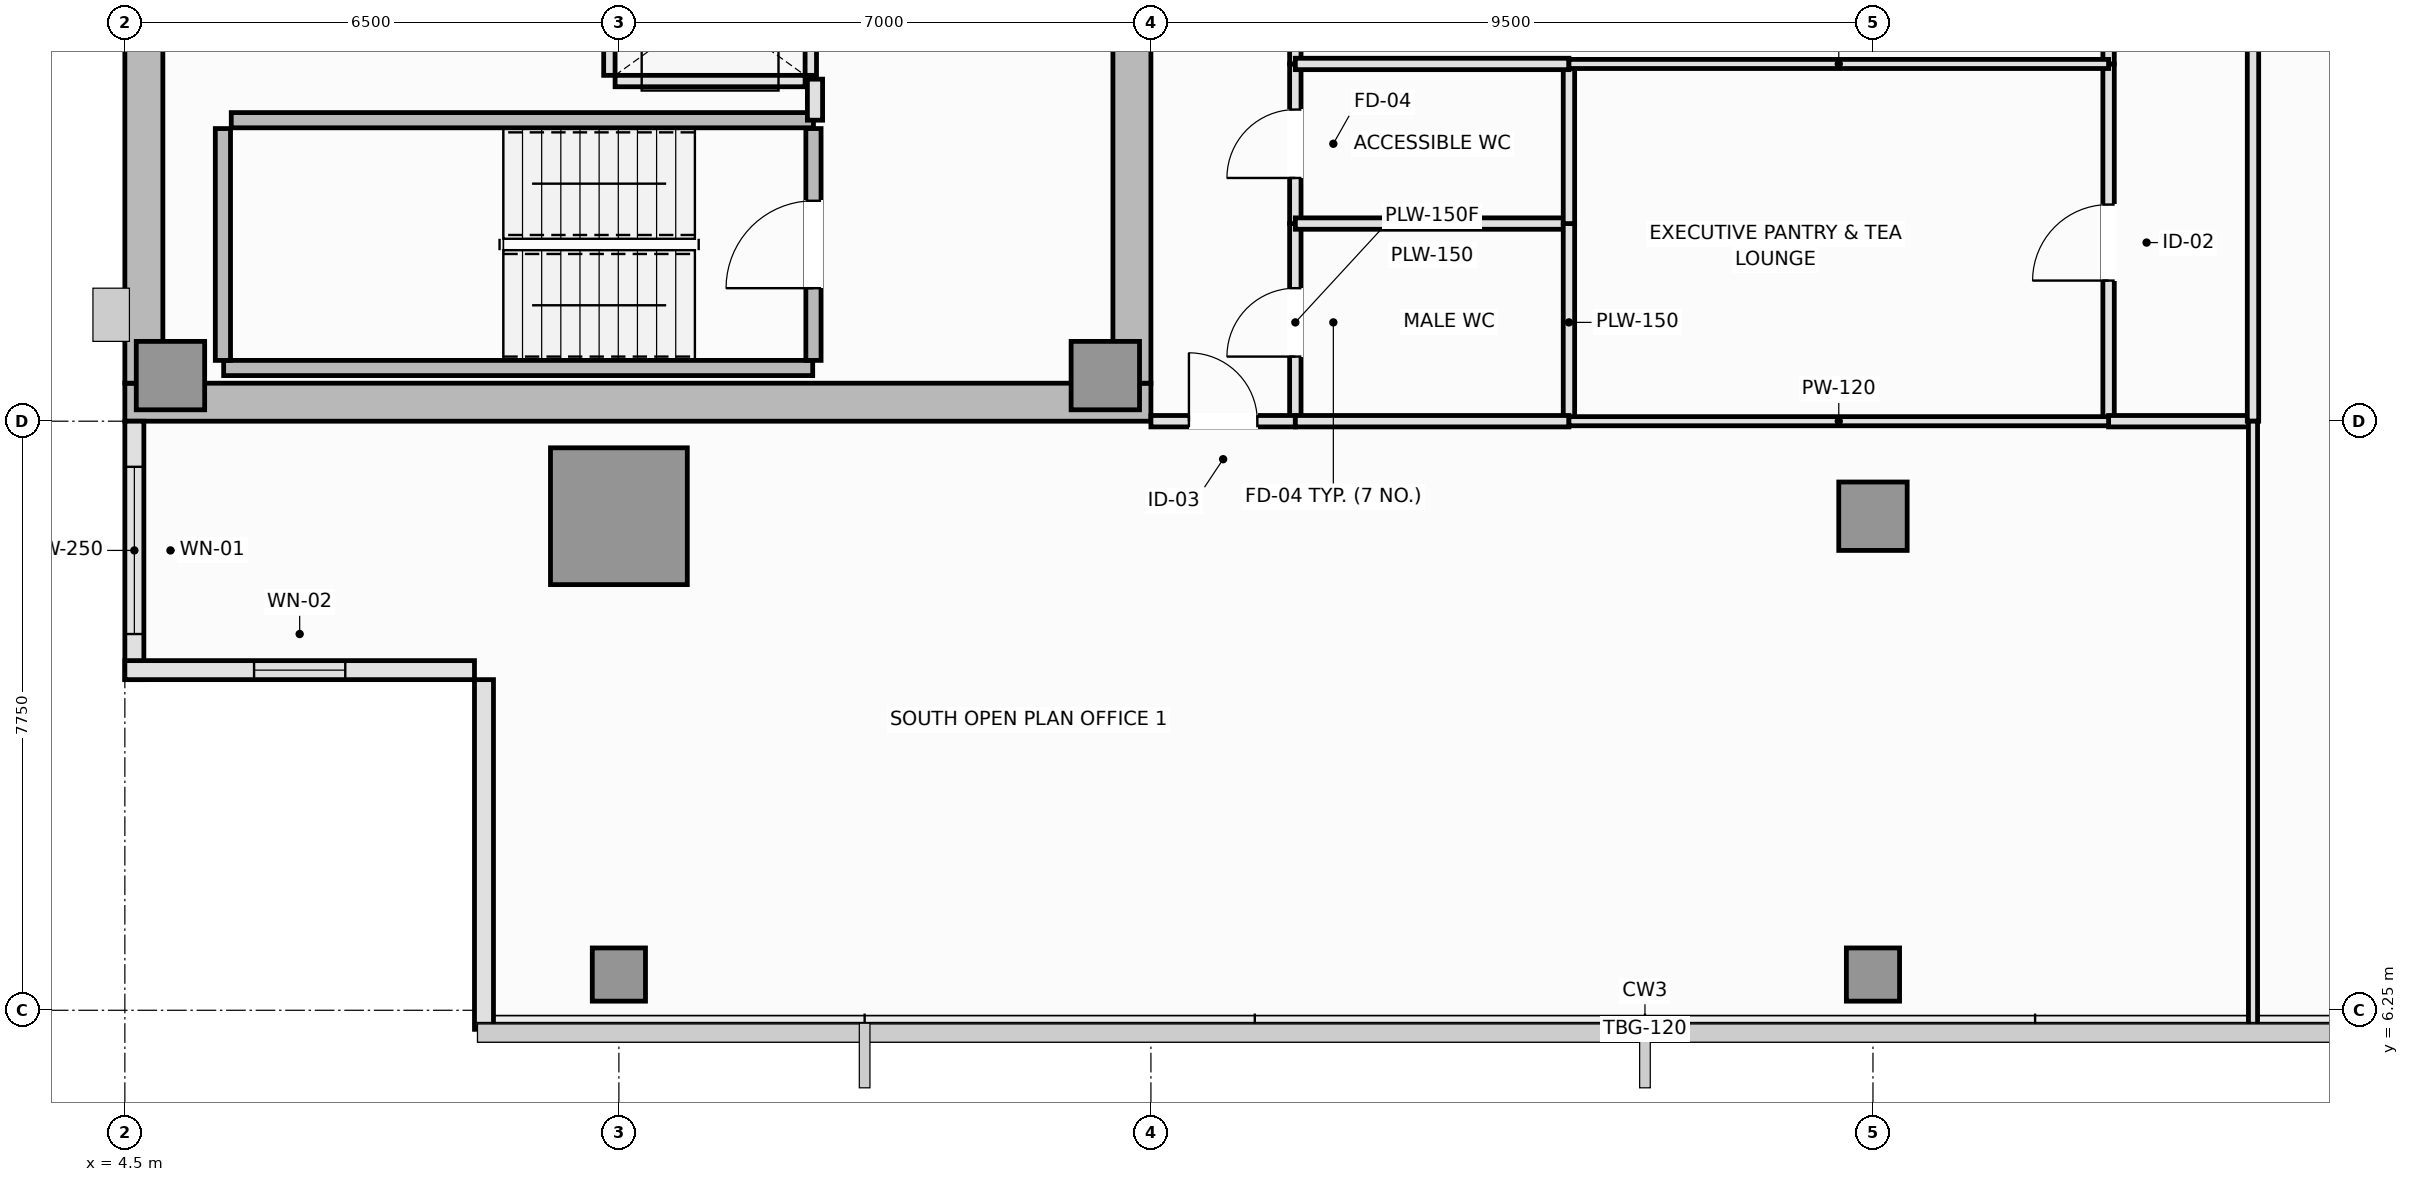
"""IFC4 building model, lengths in metres.
Left out: names, types, materials, properties, quantities, classifications, styles, units other than length and angle.
Written with IfcOpenShell. Run it as: python <this file> out.ifc"""

import sys

from ifc_helpers import new_model, si_unit, direction, frame, frame_2d, origin, origin_2d, place, context, subcontext, project, spatial, rectangle, extrude, element, fill, save


model = new_model("IFC4")
c1 = context("Model", 3, precision=1e-05, world=origin(), true_north=direction((0.0, 1.0)))
c2 = subcontext(c1, "Body", "Model", "MODEL_VIEW")
j1 = project(units=[si_unit("LENGTHUNIT", "METRE"), si_unit("PLANEANGLEUNIT", "RADIAN")], contexts=[c1])
p1 = place(None, origin())
s1 = spatial("IfcSite", under=j1, at=p1, CompositionType="ELEMENT")
p2 = place(p1, origin())
s2 = spatial("IfcBuilding", under=s1, at=p2, CompositionType="ELEMENT")
p3 = place(p2, frame((0.0, 0.0, 259.9)))
s3 = spatial("IfcBuildingStorey", under=s2, at=p3, CompositionType="ELEMENT", Elevation=259.9)
p4 = place(p3, frame((4.5, 14.25, 0.0), z_axis=(0.0, 0.0, 1.0), x_axis=(1.0, 0.0, 0.0)))
e1 = element("IfcWall", 1, at=p4, inside=s3, PredefinedType="SHEAR", context=c2, shape_type="SweptSolid", body=[
    extrude(rectangle(XDim=13.5, YDim=0.5, at=frame_2d((6.75, 0.0))), origin(), (0.0, 0.0, 1.0), 3.55),
])
p5 = place(p3, frame((4.75, 14.5, 0.0), z_axis=(0.0, 0.0, 1.0), x_axis=(0.0, 1.0, 0.0)))
e2 = element("IfcWall", 2, at=p5, inside=s3, PredefinedType="SHEAR", context=c2, shape_type="SweptSolid", body=[
    extrude(rectangle(XDim=21.5, YDim=0.5, at=frame_2d((10.75, 0.0))), origin(), (0.0, 0.0, 1.0), 3.55),
])
p6 = place(p3, frame((17.75, 14.5, 0.0), z_axis=(0.0, 0.0, 1.0), x_axis=(0.0, 1.0, 0.0)))
e3 = element("IfcWall", 3, at=p6, inside=s3, PredefinedType="SHEAR", context=c2, shape_type="SweptSolid", body=[
    extrude(rectangle(XDim=8.95, YDim=0.5, at=frame_2d((4.475, 0.0))), origin(), (0.0, 0.0, 1.0), 3.55),
])
p7 = place(p6, frame((4.4, 0.0, 0.0)))
e4 = element("IfcOpeningElement", 4, at=p7, cuts=e3, PredefinedType="OPENING", context=c2, shape_type="SweptSolid", body=[
    extrude(rectangle(XDim=1.1, YDim=2.15, at=frame_2d((0.55, 1.075))), frame((0.0, 0.26, 0.0), z_axis=(0.0, -1.0, 0.0), x_axis=(1.0, 0.0, 0.0)), (0.0, 0.0, 1.0), 0.52),
])
for number, where, z_axis, x_axis in (
    (5, (5.1, 14.6, 0.0), (0.0, 0.0, 1.0), (1.0, 0.0, 0.0)),
    (6, (17.4, 14.6, 0.0), (0.0, 0.0, 1.0), (1.0, 0.0, 0.0)),
):
    element("IfcColumn", number, at=place(p3, frame(where, z_axis=z_axis, x_axis=x_axis)), inside=s3, PredefinedType="PILASTER", context=c2, shape_type="SweptSolid", body=[
        extrude(rectangle(XDim=0.9, YDim=0.9, at=origin_2d()), origin(), (0.0, 0.0, 1.0), 3.55),
    ])
p8 = place(p3, frame((11.0, 12.75, 0.0), z_axis=(0.0, 0.0, 1.0), x_axis=(1.0, 0.0, 0.0)))
e7 = element("IfcColumn", 7, at=p8, inside=s3, PredefinedType="COLUMN", context=c2, shape_type="SweptSolid", body=[
    extrude(rectangle(XDim=1.8, YDim=1.8, at=origin_2d()), origin(), (0.0, 0.0, 1.0), 3.55),
])
p9 = place(p3, frame((27.5, 12.75, 0.0), z_axis=(0.0, 0.0, 1.0), x_axis=(1.0, 0.0, 0.0)))
e8 = element("IfcColumn", 8, at=p9, inside=s3, PredefinedType="COLUMN", context=c2, shape_type="SweptSolid", body=[
    extrude(rectangle(XDim=0.9, YDim=0.9, at=origin_2d()), origin(), (0.0, 0.0, 1.0), 3.55),
])
for number, where, z_axis, x_axis in (
    (9, (11.0, 6.72, 0.0), (0.0, 0.0, 1.0), (1.0, 0.0, 0.0)),
    (10, (27.5, 6.72, 0.0), (0.0, 0.0, 1.0), (1.0, 0.0, 0.0)),
):
    element("IfcColumn", number, at=place(p3, frame(where, z_axis=z_axis, x_axis=x_axis)), inside=s3, PredefinedType="COLUMN", context=c2, shape_type="SweptSolid", body=[
        extrude(rectangle(XDim=0.7, YDim=0.7, at=origin_2d()), origin(), (0.0, 0.0, 1.0), 3.55),
    ])
p10 = place(p3, frame((4.625, 14.0, 0.0), z_axis=(0.0, 0.0, 1.0), x_axis=(0.0, -1.0, 0.0)))
e11 = element("IfcWall", 11, at=p10, inside=s3, PredefinedType="SOLIDWALL", context=c2, shape_type="SweptSolid", body=[
    extrude(rectangle(XDim=3.4, YDim=0.25, at=frame_2d((1.7, 0.0))), origin(), (0.0, 0.0, 1.0), 3.39),
])
p11 = place(p10, frame((0.6, 0.0, 0.9)))
e12 = element("IfcOpeningElement", 12, at=p11, cuts=e11, PredefinedType="OPENING", context=c2, shape_type="SweptSolid", body=[
    extrude(rectangle(XDim=2.2, YDim=1.8, at=frame_2d((1.1, 0.9))), frame((0.0, 0.135, 0.0), z_axis=(0.0, -1.0, 0.0), x_axis=(1.0, 0.0, 0.0)), (0.0, 0.0, 1.0), 0.27),
])
p12 = place(p3, frame((4.5, 10.725, 0.0), z_axis=(0.0, 0.0, 1.0), x_axis=(1.0, 0.0, 0.0)))
e13 = element("IfcWall", 13, at=p12, inside=s3, PredefinedType="SOLIDWALL", context=c2, shape_type="SweptSolid", body=[
    extrude(rectangle(XDim=4.6, YDim=0.25, at=frame_2d((2.3, 0.0))), origin(), (0.0, 0.0, 1.0), 3.39),
])
p13 = place(p12, frame((1.7, 0.0, 0.9)))
e14 = element("IfcOpeningElement", 14, at=p13, cuts=e13, PredefinedType="OPENING", context=c2, shape_type="SweptSolid", body=[
    extrude(rectangle(XDim=1.2, YDim=1.8, at=frame_2d((0.6, 0.9))), frame((0.0, 0.135, 0.0), z_axis=(0.0, -1.0, 0.0), x_axis=(1.0, 0.0, 0.0)), (0.0, 0.0, 1.0), 0.27),
])
p14 = place(p3, frame((9.225, 10.6, 0.0), z_axis=(0.0, 0.0, 1.0), x_axis=(0.0, -1.0, 0.0)))
e15 = element("IfcWall", 15, at=p14, inside=s3, PredefinedType="SOLIDWALL", context=c2, shape_type="SweptSolid", body=[
    extrude(rectangle(XDim=4.6, YDim=0.25, at=frame_2d((2.3, 0.0))), origin(), (0.0, 0.0, 1.0), 3.39),
])
p15 = place(p3, frame((5.8, 14.7, 0.0), z_axis=(0.0, 0.0, 1.0), x_axis=(1.0, 0.0, 0.0)))
e16 = element("IfcWall", 16, at=p15, inside=s3, PredefinedType="SOLIDWALL", context=c2, shape_type="SweptSolid", body=[
    extrude(rectangle(XDim=7.75, YDim=0.2, at=frame_2d((3.875, 0.0))), origin(), (0.0, 0.0, 1.0), 3.55),
])
p16 = place(p3, frame((5.79, 14.8, 0.0), z_axis=(0.0, 0.0, 1.0), x_axis=(0.0, 1.0, 0.0)))
e17 = element("IfcWall", 17, at=p16, inside=s3, PredefinedType="SOLIDWALL", context=c2, shape_type="SweptSolid", body=[
    extrude(rectangle(XDim=3.05, YDim=0.2, at=frame_2d((1.525, 0.0))), origin(), (0.0, 0.0, 1.0), 3.55),
])
p17 = place(p3, frame((5.9, 17.96, 0.0), z_axis=(0.0, 0.0, 1.0), x_axis=(1.0, 0.0, 0.0)))
e18 = element("IfcWall", 18, at=p17, inside=s3, PredefinedType="SOLIDWALL", context=c2, shape_type="SweptSolid", body=[
    extrude(rectangle(XDim=7.66, YDim=0.2, at=frame_2d((3.83, 0.0))), origin(), (0.0, 0.0, 1.0), 3.55),
])
p18 = place(p3, frame((13.56, 14.8, 0.0), z_axis=(0.0, 0.0, 1.0), x_axis=(0.0, 1.0, 0.0)))
e19 = element("IfcWall", 19, at=p18, inside=s3, PredefinedType="SOLIDWALL", context=c2, shape_type="SweptSolid", body=[
    extrude(rectangle(XDim=3.05, YDim=0.2, at=frame_2d((1.525, 0.0))), origin(), (0.0, 0.0, 1.0), 3.55),
])
p19 = place(p18, frame((0.95, 0.0, 0.0)))
e20 = element("IfcOpeningElement", 20, at=p19, cuts=e19, PredefinedType="OPENING", context=c2, shape_type="SweptSolid", body=[
    extrude(rectangle(XDim=1.15, YDim=2.15, at=frame_2d((0.575, 1.075))), frame((0.0, 0.11, 0.0), z_axis=(0.0, -1.0, 0.0), x_axis=(1.0, 0.0, 0.0)), (0.0, 0.0, 1.0), 0.22),
])
p20 = place(p3, frame((10.95, 18.475, 0.0), z_axis=(0.0, 0.0, 1.0), x_axis=(1.0, 0.0, 0.0)))
e21 = element("IfcWall", 21, at=p20, inside=s3, PredefinedType="PARTITIONING", context=c2, shape_type="SweptSolid", body=[
    extrude(rectangle(XDim=2.5, YDim=0.15, at=frame_2d((1.25, 0.0))), origin(), (0.0, 0.0, 1.0), 3.39),
])
p21 = place(p3, frame((10.875, 18.55, 0.0), z_axis=(0.0, 0.0, 1.0), x_axis=(0.0, 1.0, 0.0)))
e22 = element("IfcWall", 22, at=p21, inside=s3, PredefinedType="PARTITIONING", context=c2, shape_type="SweptSolid", body=[
    extrude(rectangle(XDim=1.8, YDim=0.15, at=frame_2d((0.9, 0.0))), origin(), (0.0, 0.0, 1.0), 3.39),
])
p22 = place(p3, frame((13.525, 18.55, 0.0), z_axis=(0.0, 0.0, 1.0), x_axis=(0.0, 1.0, 0.0)))
e23 = element("IfcWall", 23, at=p22, inside=s3, PredefinedType="PARTITIONING", context=c2, shape_type="SweptSolid", body=[
    extrude(rectangle(XDim=1.8, YDim=0.15, at=frame_2d((0.9, 0.0))), origin(), (0.0, 0.0, 1.0), 3.39),
])
p23 = place(p22, frame((0.35, 0.0, 0.0)))
e24 = element("IfcOpeningElement", 24, at=p23, cuts=e23, PredefinedType="OPENING", context=c2, shape_type="SweptSolid", body=[
    extrude(rectangle(XDim=1.1, YDim=2.2, at=frame_2d((0.55, 1.1))), frame((0.0, 0.085, 0.0), z_axis=(0.0, -1.0, 0.0), x_axis=(1.0, 0.0, 0.0)), (0.0, 0.0, 1.0), 0.17),
])
p24 = place(p3, frame((13.58, 17.96, 0.0), z_axis=(0.0, 0.0, 1.0), x_axis=(0.0, 1.0, 0.0)))
e25 = element("IfcWall", 25, at=p24, inside=s3, PredefinedType="PARTITIONING", context=c2, shape_type="SweptSolid", body=[
    extrude(rectangle(XDim=0.54, YDim=0.2, at=frame_2d((0.27, 0.0))), origin(), (0.0, 0.0, 1.0), 3.39),
])
p25 = place(p3, frame((19.9, 14.0, 0.0), z_axis=(0.0, 0.0, 1.0), x_axis=(0.0, 1.0, 0.0)))
e26 = element("IfcWall", 26, at=p25, inside=s3, PredefinedType="PLUMBINGWALL", context=c2, shape_type="SweptSolid", body=[
    extrude(rectangle(XDim=2.6, YDim=0.15, at=frame_2d((1.3, 0.0))), origin(), (0.0, 0.0, 1.0), 3.39),
])
p26 = place(p25, frame((0.85, 0.0, 0.0)))
e27 = element("IfcOpeningElement", 27, at=p26, cuts=e26, PredefinedType="OPENING", context=c2, shape_type="SweptSolid", body=[
    extrude(rectangle(XDim=0.9, YDim=2.1, at=frame_2d((0.45, 1.05))), frame((0.0, 0.085, 0.0), z_axis=(0.0, -1.0, 0.0), x_axis=(1.0, 0.0, 0.0)), (0.0, 0.0, 1.0), 0.17),
])
p27 = place(p3, frame((19.9, 16.6, 0.0), z_axis=(0.0, 0.0, 1.0), x_axis=(0.0, 1.0, 0.0)))
e28 = element("IfcWall", 28, at=p27, inside=s3, PredefinedType="PLUMBINGWALL", context=c2, shape_type="SweptSolid", body=[
    extrude(rectangle(XDim=2.1, YDim=0.15, at=frame_2d((1.05, 0.0))), origin(), (0.0, 0.0, 1.0), 3.39),
])
p28 = place(p27, frame((0.6, 0.0, 0.0)))
e29 = element("IfcOpeningElement", 29, at=p28, cuts=e28, PredefinedType="OPENING", context=c2, shape_type="SweptSolid", body=[
    extrude(rectangle(XDim=0.9, YDim=2.1, at=frame_2d((0.45, 1.05))), frame((0.0, 0.085, 0.0), z_axis=(0.0, -1.0, 0.0), x_axis=(1.0, 0.0, 0.0)), (0.0, 0.0, 1.0), 0.17),
])
p29 = place(p3, frame((19.9, 18.7, 0.0), z_axis=(0.0, 0.0, 1.0), x_axis=(0.0, 1.0, 0.0)))
e30 = element("IfcWall", 30, at=p29, inside=s3, PredefinedType="PARTITIONING", context=c2, shape_type="SweptSolid", body=[
    extrude(rectangle(XDim=7.5, YDim=0.15, at=frame_2d((3.75, 0.0))), origin(), (0.0, 0.0, 1.0), 3.39),
])
p30 = place(p3, frame((18.0, 14.0, 0.0), z_axis=(0.0, 0.0, 1.0), x_axis=(1.0, 0.0, 0.0)))
e31 = element("IfcWall", 31, at=p30, inside=s3, PredefinedType="PARTITIONING", context=c2, shape_type="SweptSolid", body=[
    extrude(rectangle(XDim=1.9, YDim=0.15, at=frame_2d((0.95, 0.0))), origin(), (0.0, 0.0, 1.0), 3.39),
])
p31 = place(p30, frame((0.5, 0.0, 0.0)))
e32 = element("IfcOpeningElement", 32, at=p31, cuts=e31, PredefinedType="OPENING", context=c2, shape_type="SweptSolid", body=[
    extrude(rectangle(XDim=0.9, YDim=2.1, at=frame_2d((0.45, 1.05))), frame((0.0, 0.085, 0.0), z_axis=(0.0, -1.0, 0.0), x_axis=(1.0, 0.0, 0.0)), (0.0, 0.0, 1.0), 0.17),
])
p32 = place(p3, frame((30.6, 14.0, 0.0), z_axis=(0.0, 0.0, 1.0), x_axis=(0.0, 1.0, 0.0)))
e33 = element("IfcWall", 33, at=p32, inside=s3, PredefinedType="PARTITIONING", context=c2, shape_type="SweptSolid", body=[
    extrude(rectangle(XDim=4.7, YDim=0.15, at=frame_2d((2.35, 0.0))), origin(), (0.0, 0.0, 1.0), 3.39),
])
p33 = place(p32, frame((1.85, 0.0, 0.0)))
e34 = element("IfcOpeningElement", 34, at=p33, cuts=e33, PredefinedType="OPENING", context=c2, shape_type="SweptSolid", body=[
    extrude(rectangle(XDim=1.0, YDim=2.15, at=frame_2d((0.5, 1.075))), frame((0.0, 0.085, 0.0), z_axis=(0.0, -1.0, 0.0), x_axis=(1.0, 0.0, 0.0)), (0.0, 0.0, 1.0), 0.17),
])
p34 = place(p3, frame((30.6, 18.7, 0.0), z_axis=(0.0, 0.0, 1.0), x_axis=(0.0, 1.0, 0.0)))
e35 = element("IfcWall", 35, at=p34, inside=s3, PredefinedType="PARTITIONING", context=c2, shape_type="SweptSolid", body=[
    extrude(rectangle(XDim=7.5, YDim=0.15, at=frame_2d((3.75, 0.0))), origin(), (0.0, 0.0, 1.0), 3.39),
])
p35 = place(p3, frame((30.6, 14.0, 0.0), z_axis=(0.0, 0.0, 1.0), x_axis=(1.0, 0.0, 0.0)))
e36 = element("IfcWall", 36, at=p35, inside=s3, PredefinedType="PARTITIONING", context=c2, shape_type="SweptSolid", body=[
    extrude(rectangle(XDim=1.9, YDim=0.15, at=frame_2d((0.95, 0.0))), origin(), (0.0, 0.0, 1.0), 3.39),
])
p36 = place(p3, frame((32.5, 14.0, 0.0), z_axis=(0.0, 0.0, 1.0), x_axis=(0.0, 1.0, 0.0)))
e37 = element("IfcWall", 37, at=p36, inside=s3, PredefinedType="PARTITIONING", context=c2, shape_type="SweptSolid", body=[
    extrude(rectangle(XDim=11.25, YDim=0.15, at=frame_2d((5.625, 0.0))), origin(), (0.0, 0.0, 1.0), 3.12),
])
p37 = place(p36, frame((5.125, 0.0, 0.0)))
e38 = element("IfcOpeningElement", 38, at=p37, cuts=e37, PredefinedType="OPENING", context=c2, shape_type="SweptSolid", body=[
    extrude(rectangle(XDim=1.0, YDim=2.15, at=frame_2d((0.5, 1.075))), frame((0.0, 0.085, 0.0), z_axis=(0.0, -1.0, 0.0), x_axis=(1.0, 0.0, 0.0)), (0.0, 0.0, 1.0), 0.17),
])
p38 = place(p3, frame((19.9, 16.6, 0.0), z_axis=(0.0, 0.0, 1.0), x_axis=(1.0, 0.0, 0.0)))
e39 = element("IfcWall", 39, at=p38, inside=s3, PredefinedType="PLUMBINGWALL", context=c2, shape_type="SweptSolid", body=[
    extrude(rectangle(XDim=3.6, YDim=0.15, at=frame_2d((1.8, 0.0))), origin(), (0.0, 0.0, 1.0), 3.39),
])
p39 = place(p3, frame((23.5, 14.0, 0.0), z_axis=(0.0, 0.0, 1.0), x_axis=(0.0, 1.0, 0.0)))
e40 = element("IfcWall", 40, at=p39, inside=s3, PredefinedType="PLUMBINGWALL", context=c2, shape_type="SweptSolid", body=[
    extrude(rectangle(XDim=2.6, YDim=0.15, at=frame_2d((1.3, 0.0))), origin(), (0.0, 0.0, 1.0), 3.39),
])
p40 = place(p3, frame((19.9, 14.0, 0.0), z_axis=(0.0, 0.0, 1.0), x_axis=(1.0, 0.0, 0.0)))
e41 = element("IfcWall", 41, at=p40, inside=s3, PredefinedType="PLUMBINGWALL", context=c2, shape_type="SweptSolid", body=[
    extrude(rectangle(XDim=3.6, YDim=0.15, at=frame_2d((1.8, 0.0))), origin(), (0.0, 0.0, 1.0), 3.39),
])
p41 = place(p3, frame((23.5, 16.6, 0.0), z_axis=(0.0, 0.0, 1.0), x_axis=(0.0, 1.0, 0.0)))
e42 = element("IfcWall", 42, at=p41, inside=s3, PredefinedType="PLUMBINGWALL", context=c2, shape_type="SweptSolid", body=[
    extrude(rectangle(XDim=2.1, YDim=0.15, at=frame_2d((1.05, 0.0))), origin(), (0.0, 0.0, 1.0), 3.39),
])
p42 = place(p3, frame((19.9, 18.7, 0.0), z_axis=(0.0, 0.0, 1.0), x_axis=(1.0, 0.0, 0.0)))
e43 = element("IfcWall", 43, at=p42, inside=s3, PredefinedType="PLUMBINGWALL", context=c2, shape_type="SweptSolid", body=[
    extrude(rectangle(XDim=3.6, YDim=0.15, at=frame_2d((1.8, 0.0))), origin(), (0.0, 0.0, 1.0), 3.39),
])
for number, where, z_axis, x_axis in (
    (44, (23.5, 18.7, 0.0), (0.0, 0.0, 1.0), (1.0, 0.0, 0.0)),
    (45, (23.5, 14.0, 0.0), (0.0, 0.0, 1.0), (1.0, 0.0, 0.0)),
):
    element("IfcWall", number, at=place(p3, frame(where, z_axis=z_axis, x_axis=x_axis)), inside=s3, PredefinedType="PARTITIONING", context=c2, shape_type="SweptSolid", body=[
        extrude(rectangle(XDim=7.1, YDim=0.12, at=frame_2d((3.55, 0.0))), origin(), (0.0, 0.0, 1.0), 3.39),
    ])
p43 = place(p3, frame((32.5, 6.01, 0.0), z_axis=(0.0, 0.0, 1.0), x_axis=(0.0, 1.0, 0.0)))
e46 = element("IfcWall", 46, at=p43, inside=s3, PredefinedType="PARTITIONING", context=c2, shape_type="SweptSolid", body=[
    extrude(rectangle(XDim=7.99, YDim=0.12, at=frame_2d((3.995, 0.0))), origin(), (0.0, 0.0, 1.0), 3.12),
])
p44 = place(p11, origin())
e47 = element("IfcWindow", 47, at=p44, inside=s3, PartitioningType="SINGLE_PANEL", PredefinedType="WINDOW", context=c2, shape_type="SweptSolid", body=[
    extrude(rectangle(XDim=2.2, YDim=1.8, at=frame_2d((1.1, 0.9))), frame((0.0, 0.03, 0.0), z_axis=(0.0, -1.0, 0.0), x_axis=(1.0, 0.0, 0.0)), (0.0, 0.0, 1.0), 0.06),
])
fill(e12, e47)
p45 = place(p13, origin())
e48 = element("IfcWindow", 48, at=p45, inside=s3, PartitioningType="SINGLE_PANEL", PredefinedType="WINDOW", context=c2, shape_type="SweptSolid", body=[
    extrude(rectangle(XDim=1.2, YDim=1.8, at=frame_2d((0.6, 0.9))), frame((0.0, 0.03, 0.0), z_axis=(0.0, -1.0, 0.0), x_axis=(1.0, 0.0, 0.0)), (0.0, 0.0, 1.0), 0.06),
])
fill(e14, e48)
p46 = place(p19, origin())
e49 = element("IfcDoor", 49, at=p46, inside=s3, OperationType="SINGLE_SWING_LEFT", PredefinedType="DOOR", context=c2, shape_type="SweptSolid", body=[
    extrude(rectangle(XDim=1.15, YDim=2.15, at=frame_2d((0.575, 1.075))), frame((0.0, 0.025, 0.0), z_axis=(0.0, -1.0, 0.0), x_axis=(1.0, 0.0, 0.0)), (0.0, 0.0, 1.0), 0.05),
])
fill(e20, e49)
p47 = place(p26, origin())
e50 = element("IfcDoor", 50, at=p47, inside=s3, OperationType="SINGLE_SWING_LEFT", PredefinedType="DOOR", context=c2, shape_type="SweptSolid", body=[
    extrude(rectangle(XDim=0.9, YDim=2.1, at=frame_2d((0.45, 1.05))), frame((0.0, 0.025, 0.0), z_axis=(0.0, -1.0, 0.0), x_axis=(1.0, 0.0, 0.0)), (0.0, 0.0, 1.0), 0.05),
])
fill(e27, e50)
p48 = place(p28, origin())
e51 = element("IfcDoor", 51, at=p48, inside=s3, OperationType="SINGLE_SWING_LEFT", PredefinedType="DOOR", context=c2, shape_type="SweptSolid", body=[
    extrude(rectangle(XDim=0.9, YDim=2.1, at=frame_2d((0.45, 1.05))), frame((0.0, 0.025, 0.0), z_axis=(0.0, -1.0, 0.0), x_axis=(1.0, 0.0, 0.0)), (0.0, 0.0, 1.0), 0.05),
])
fill(e29, e51)
p49 = place(p31, origin())
e52 = element("IfcDoor", 52, at=p49, inside=s3, OperationType="SINGLE_SWING_LEFT", PredefinedType="DOOR", context=c2, shape_type="SweptSolid", body=[
    extrude(rectangle(XDim=0.9, YDim=2.1, at=frame_2d((0.45, 1.05))), frame((0.0, 0.025, 0.0), z_axis=(0.0, -1.0, 0.0), x_axis=(1.0, 0.0, 0.0)), (0.0, 0.0, 1.0), 0.05),
])
fill(e32, e52)
p50 = place(p33, origin())
e53 = element("IfcDoor", 53, at=p50, inside=s3, OperationType="SINGLE_SWING_LEFT", PredefinedType="DOOR", context=c2, shape_type="SweptSolid", body=[
    extrude(rectangle(XDim=1.0, YDim=2.15, at=frame_2d((0.5, 1.075))), frame((0.0, 0.025, 0.0), z_axis=(0.0, -1.0, 0.0), x_axis=(1.0, 0.0, 0.0)), (0.0, 0.0, 1.0), 0.05),
])
fill(e34, e53)
save(model, sys.argv[1])
